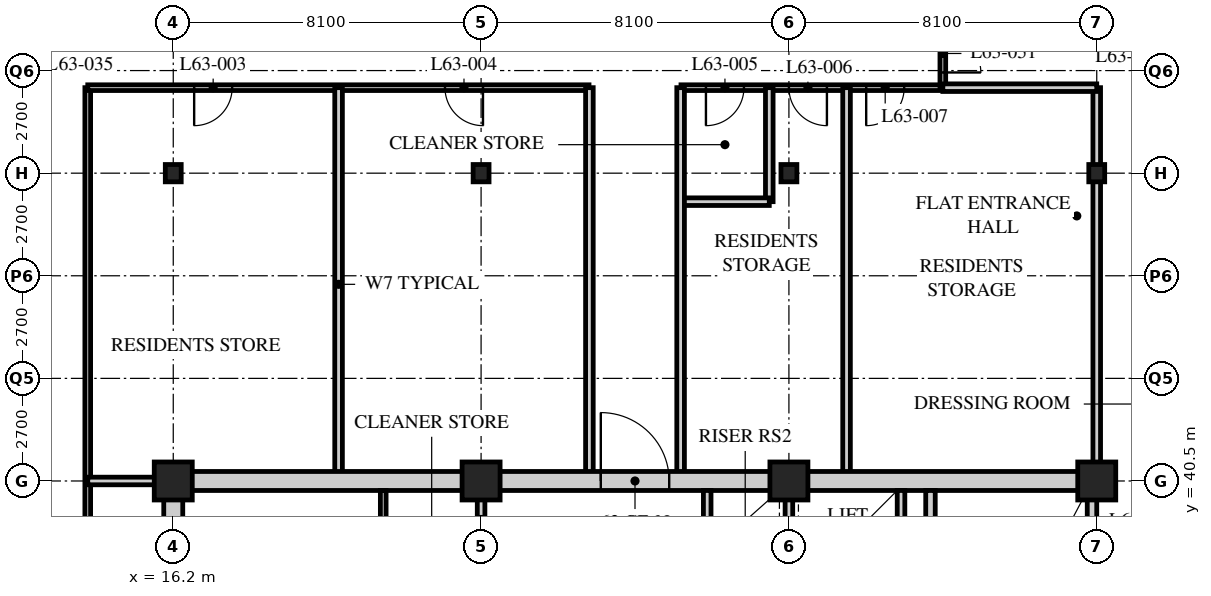
"""IFC4 building model, lengths in metres.
Left out: names, types, materials, properties, quantities, classifications, styles, units other than length and angle.
Written with IfcOpenShell. Run it as: python <this file> out.ifc"""

import sys

from ifc_helpers import new_model, si_unit, direction, frame, frame_2d, origin, origin_2d, place, context, subcontext, project, spatial, rectangle, hollow_rectangle, i_section, extrude, element, fill, save


model = new_model("IFC4")
c1 = context("Model", 3, precision=1e-05, world=origin(), true_north=direction((0.0, 1.0)))
c2 = subcontext(c1, "Body", "Model", "MODEL_VIEW")
j1 = project(units=[si_unit("LENGTHUNIT", "METRE"), si_unit("PLANEANGLEUNIT", "RADIAN")], contexts=[c1])
p1 = place(None, origin())
s1 = spatial("IfcSite", under=j1, at=p1, CompositionType="ELEMENT")
p2 = place(p1, origin())
s2 = spatial("IfcBuilding", under=s1, at=p2, CompositionType="ELEMENT")
p3 = place(p2, frame((0.0, 0.0, 246.3)))
s3 = spatial("IfcBuildingStorey", under=s2, at=p3, CompositionType="ELEMENT", Elevation=246.3)
p4 = place(p3, frame((16.2, 40.5, 0.0), z_axis=(0.0, 0.0, 1.0), x_axis=(1.0, 0.0, 0.0)))
e1 = element("IfcColumn", 1, at=p4, inside=s3, PredefinedType="COLUMN", context=c2, shape_type="SweptSolid", body=[
    extrude(hollow_rectangle(XDim=1.0, YDim=1.0, WallThickness=0.1, at=origin_2d()), origin(), (0.0, 0.0, 1.0), 3.9),
])
p5 = place(p3, frame((16.2, 48.6, 0.0), z_axis=(0.0, 0.0, 1.0), x_axis=(1.0, 0.0, 0.0)))
e2 = element("IfcColumn", 2, at=p5, inside=s3, PredefinedType="COLUMN", context=c2, shape_type="SweptSolid", body=[
    extrude(i_section(OverallWidth=0.418, OverallDepth=0.456, WebThickness=0.042, FlangeThickness=0.067, FilletRadius=0.015, at=origin_2d()), origin(), (0.0, 0.0, 1.0), 3.9),
])
p6 = place(p3, frame((24.3, 40.5, 0.0), z_axis=(0.0, 0.0, 1.0), x_axis=(1.0, 0.0, 0.0)))
e3 = element("IfcColumn", 3, at=p6, inside=s3, PredefinedType="COLUMN", context=c2, shape_type="SweptSolid", body=[
    extrude(hollow_rectangle(XDim=1.0, YDim=1.0, WallThickness=0.1, at=origin_2d()), origin(), (0.0, 0.0, 1.0), 3.9),
])
p7 = place(p3, frame((24.3, 48.6, 0.0), z_axis=(0.0, 0.0, 1.0), x_axis=(1.0, 0.0, 0.0)))
e4 = element("IfcColumn", 4, at=p7, inside=s3, PredefinedType="COLUMN", context=c2, shape_type="SweptSolid", body=[
    extrude(i_section(OverallWidth=0.418, OverallDepth=0.456, WebThickness=0.042, FlangeThickness=0.067, FilletRadius=0.015, at=origin_2d()), origin(), (0.0, 0.0, 1.0), 3.9),
])
p8 = place(p3, frame((32.4, 40.5, 0.0), z_axis=(0.0, 0.0, 1.0), x_axis=(1.0, 0.0, 0.0)))
e5 = element("IfcColumn", 5, at=p8, inside=s3, PredefinedType="COLUMN", context=c2, shape_type="SweptSolid", body=[
    extrude(hollow_rectangle(XDim=1.0, YDim=1.0, WallThickness=0.1, at=origin_2d()), origin(), (0.0, 0.0, 1.0), 3.9),
])
p9 = place(p3, frame((32.4, 48.6, 0.0), z_axis=(0.0, 0.0, 1.0), x_axis=(1.0, 0.0, 0.0)))
e6 = element("IfcColumn", 6, at=p9, inside=s3, PredefinedType="COLUMN", context=c2, shape_type="SweptSolid", body=[
    extrude(i_section(OverallWidth=0.418, OverallDepth=0.456, WebThickness=0.042, FlangeThickness=0.067, FilletRadius=0.015, at=origin_2d()), origin(), (0.0, 0.0, 1.0), 3.9),
])
p10 = place(p3, frame((40.5, 40.5, 0.0), z_axis=(0.0, 0.0, 1.0), x_axis=(1.0, 0.0, 0.0)))
e7 = element("IfcColumn", 7, at=p10, inside=s3, PredefinedType="COLUMN", context=c2, shape_type="SweptSolid", body=[
    extrude(hollow_rectangle(XDim=1.0, YDim=1.0, WallThickness=0.1, at=origin_2d()), origin(), (0.0, 0.0, 1.0), 3.9),
])
p11 = place(p3, frame((40.5, 48.6, 0.0), z_axis=(0.0, 0.0, 1.0), x_axis=(1.0, 0.0, 0.0)))
e8 = element("IfcColumn", 8, at=p11, inside=s3, PredefinedType="COLUMN", context=c2, shape_type="SweptSolid", body=[
    extrude(i_section(OverallWidth=0.418, OverallDepth=0.456, WebThickness=0.042, FlangeThickness=0.067, FilletRadius=0.015, at=origin_2d()), origin(), (0.0, 0.0, 1.0), 3.9),
])
p12 = place(p3, frame((13.95, 24.3, 0.0), z_axis=(0.0, 0.0, 1.0), x_axis=(0.0, 1.0, 0.0)))
e9 = element("IfcWall", 9, at=p12, inside=s3, PredefinedType="PARTITIONING", context=c2, shape_type="SweptSolid", body=[
    extrude(rectangle(XDim=26.55, YDim=0.15, at=frame_2d((13.275, 0.0))), origin(), (0.0, 0.0, 1.0), 3.69),
])
p13 = place(p12, frame((3.55, 0.0, 0.0)))
e10 = element("IfcOpeningElement", 10, at=p13, cuts=e9, PredefinedType="OPENING", context=c2, shape_type="SweptSolid", body=[
    extrude(rectangle(XDim=1.0, YDim=2.1, at=frame_2d((0.5, 1.05))), frame((0.0, 0.085, 0.0), z_axis=(0.0, -1.0, 0.0), x_axis=(1.0, 0.0, 0.0)), (0.0, 0.0, 1.0), 0.17),
])
p14 = place(p12, frame((11.65, 0.0, 0.0)))
e11 = element("IfcOpeningElement", 11, at=p14, cuts=e9, PredefinedType="OPENING", context=c2, shape_type="SweptSolid", body=[
    extrude(rectangle(XDim=1.0, YDim=2.1, at=frame_2d((0.5, 1.05))), frame((0.0, 0.085, 0.0), z_axis=(0.0, -1.0, 0.0), x_axis=(1.0, 0.0, 0.0)), (0.0, 0.0, 1.0), 0.17),
])
p15 = place(p3, frame((13.95, 50.85, 0.0), z_axis=(0.0, 0.0, 1.0), x_axis=(1.0, 0.0, 0.0)))
e12 = element("IfcWall", 12, at=p15, inside=s3, PredefinedType="PARTITIONING", context=c2, shape_type="SweptSolid", body=[
    extrude(rectangle(XDim=13.19, YDim=0.15, at=frame_2d((6.595, 0.0))), origin(), (0.0, 0.0, 1.0), 3.69),
])
p16 = place(p15, frame((2.8, 0.0, 0.0)))
e13 = element("IfcOpeningElement", 13, at=p16, cuts=e12, PredefinedType="OPENING", context=c2, shape_type="SweptSolid", body=[
    extrude(rectangle(XDim=1.0, YDim=2.1, at=frame_2d((0.5, 1.05))), frame((0.0, 0.085, 0.0), z_axis=(0.0, -1.0, 0.0), x_axis=(1.0, 0.0, 0.0)), (0.0, 0.0, 1.0), 0.17),
])
p17 = place(p15, frame((9.4, 0.0, 0.0)))
e14 = element("IfcOpeningElement", 14, at=p17, cuts=e12, PredefinedType="OPENING", context=c2, shape_type="SweptSolid", body=[
    extrude(rectangle(XDim=1.0, YDim=2.1, at=frame_2d((0.5, 1.05))), frame((0.0, 0.085, 0.0), z_axis=(0.0, -1.0, 0.0), x_axis=(1.0, 0.0, 0.0)), (0.0, 0.0, 1.0), 0.17),
])
p18 = place(p3, frame((29.56, 50.85, 0.0), z_axis=(0.0, 0.0, 1.0), x_axis=(1.0, 0.0, 0.0)))
e15 = element("IfcWall", 15, at=p18, inside=s3, PredefinedType="PARTITIONING", context=c2, shape_type="SweptSolid", body=[
    extrude(rectangle(XDim=6.89, YDim=0.15, at=frame_2d((3.445, 0.0))), origin(), (0.0, 0.0, 1.0), 3.69),
])
p19 = place(p18, frame((0.657, 0.0, 0.0)))
e16 = element("IfcOpeningElement", 16, at=p19, cuts=e15, PredefinedType="OPENING", context=c2, shape_type="SweptSolid", body=[
    extrude(rectangle(XDim=1.0, YDim=2.1, at=frame_2d((0.5, 1.05))), frame((0.0, 0.085, 0.0), z_axis=(0.0, -1.0, 0.0), x_axis=(1.0, 0.0, 0.0)), (0.0, 0.0, 1.0), 0.17),
])
p20 = place(p18, frame((2.84, 0.0, 0.0)))
e17 = element("IfcOpeningElement", 17, at=p20, cuts=e15, PredefinedType="OPENING", context=c2, shape_type="SweptSolid", body=[
    extrude(rectangle(XDim=1.0, YDim=2.1, at=frame_2d((0.5, 1.05))), frame((0.0, 0.085, 0.0), z_axis=(0.0, -1.0, 0.0), x_axis=(1.0, 0.0, 0.0)), (0.0, 0.0, 1.0), 0.17),
])
p21 = place(p18, frame((4.873, 0.0, 0.0)))
e18 = element("IfcOpeningElement", 18, at=p21, cuts=e15, PredefinedType="OPENING", context=c2, shape_type="SweptSolid", body=[
    extrude(rectangle(XDim=1.0, YDim=2.1, at=frame_2d((0.5, 1.05))), frame((0.0, 0.085, 0.0), z_axis=(0.0, -1.0, 0.0), x_axis=(1.0, 0.0, 0.0)), (0.0, 0.0, 1.0), 0.17),
])
p22 = place(p3, frame((20.55, 50.85, 0.0), z_axis=(0.0, 0.0, 1.0), x_axis=(0.0, -1.0, 0.0)))
e19 = element("IfcWall", 19, at=p22, inside=s3, PredefinedType="SOLIDWALL", context=c2, shape_type="SweptSolid", body=[
    extrude(rectangle(XDim=10.35, YDim=0.2, at=frame_2d((5.175, 0.0))), origin(), (0.0, 0.0, 1.0), 3.69),
])
p23 = place(p3, frame((31.883, 50.85, 0.0), z_axis=(0.0, 0.0, 1.0), x_axis=(0.0, -1.0, 0.0)))
e20 = element("IfcWall", 20, at=p23, inside=s3, PredefinedType="SOLIDWALL", context=c2, shape_type="SweptSolid", body=[
    extrude(rectangle(XDim=3.0, YDim=0.2, at=frame_2d((1.5, 0.0))), origin(), (0.0, 0.0, 1.0), 3.69),
])
p24 = place(p3, frame((29.55, 47.85, 0.0), z_axis=(0.0, 0.0, 1.0), x_axis=(1.0, 0.0, 0.0)))
e21 = element("IfcWall", 21, at=p24, inside=s3, PredefinedType="SOLIDWALL", context=c2, shape_type="SweptSolid", body=[
    extrude(rectangle(XDim=2.333, YDim=0.2, at=frame_2d((1.167, 0.0))), origin(), (0.0, 0.0, 1.0), 3.69),
])
for number, where, z_axis, x_axis in (
    (22, (33.917, 50.85, 0.0), (0.0, 0.0, 1.0), (0.0, -1.0, 0.0)),
    (23, (27.15, 40.5, 0.0), (0.0, 0.0, 1.0), (0.0, 1.0, 0.0)),
    (24, (29.55, 40.5, 0.0), (0.0, 0.0, 1.0), (0.0, 1.0, 0.0)),
):
    element("IfcWall", number, at=place(p3, frame(where, z_axis=z_axis, x_axis=x_axis)), inside=s3, PredefinedType="SOLIDWALL", context=c2, shape_type="SweptSolid", body=[
        extrude(rectangle(XDim=10.35, YDim=0.2, at=frame_2d((5.175, 0.0))), origin(), (0.0, 0.0, 1.0), 3.69),
    ])
p25 = place(p3, frame((36.45, 50.85, 0.0), z_axis=(0.0, 0.0, 1.0), x_axis=(0.0, 1.0, 0.0)))
e25 = element("IfcWall", 25, at=p25, inside=s3, PredefinedType="PARTITIONING", context=c2, shape_type="SweptSolid", body=[
    extrude(rectangle(XDim=1.8, YDim=0.15, at=frame_2d((0.9, 0.0))), origin(), (0.0, 0.0, 1.0), 3.69),
])
p26 = place(p25, frame((0.4, 0.0, 0.0)))
e26 = element("IfcOpeningElement", 26, at=p26, cuts=e25, PredefinedType="OPENING", context=c2, shape_type="SweptSolid", body=[
    extrude(rectangle(XDim=1.0, YDim=2.1, at=frame_2d((0.5, 1.05))), frame((0.0, 0.085, 0.0), z_axis=(0.0, -1.0, 0.0), x_axis=(1.0, 0.0, 0.0)), (0.0, 0.0, 1.0), 0.17),
])
p27 = place(p3, frame((40.5, 40.5, 0.0), z_axis=(0.0, 0.0, 1.0), x_axis=(0.0, 1.0, 0.0)))
e27 = element("IfcWall", 27, at=p27, inside=s3, PredefinedType="SOLIDWALL", context=c2, shape_type="SweptSolid", body=[
    extrude(rectangle(XDim=10.35, YDim=0.2, at=frame_2d((5.175, 0.0))), origin(), (0.0, 0.0, 1.0), 3.078),
])
p28 = place(p3, frame((13.95, 40.5, 0.0), z_axis=(0.0, 0.0, 1.0), x_axis=(1.0, 0.0, 0.0)))
e28 = element("IfcWall", 28, at=p28, inside=s3, PredefinedType="SOLIDWALL", context=c2, shape_type="SweptSolid", body=[
    extrude(rectangle(XDim=2.25, YDim=0.2, at=frame_2d((1.125, 0.0))), origin(), (0.0, 0.0, 1.0), 3.078),
])
p29 = place(p3, frame((36.45, 50.85, 0.0), z_axis=(0.0, 0.0, 1.0), x_axis=(1.0, 0.0, 0.0)))
e29 = element("IfcWall", 29, at=p29, inside=s3, PredefinedType="SOLIDWALL", context=c2, shape_type="SweptSolid", body=[
    extrude(rectangle(XDim=4.05, YDim=0.2, at=frame_2d((2.025, 0.0))), origin(), (0.0, 0.0, 1.0), 3.69),
])
p30 = place(p3, frame((15.95, 40.5, 0.0), z_axis=(0.0, 0.0, 1.0), x_axis=(1.0, 0.0, 0.0)))
e30 = element("IfcWall", 30, at=p30, inside=s3, PredefinedType="SOLIDWALL", context=c2, shape_type="SweptSolid", body=[
    extrude(rectangle(XDim=24.55, YDim=0.5, at=frame_2d((12.275, 0.0))), origin(), (0.0, 0.0, 1.0), 3.04),
])
p31 = place(p30, frame((11.5, 0.0, 0.0)))
e31 = element("IfcOpeningElement", 31, at=p31, cuts=e30, PredefinedType="OPENING", context=c2, shape_type="SweptSolid", body=[
    extrude(rectangle(XDim=1.8, YDim=2.4, at=frame_2d((0.9, 1.2))), frame((0.0, 0.26, 0.0), z_axis=(0.0, -1.0, 0.0), x_axis=(1.0, 0.0, 0.0)), (0.0, 0.0, 1.0), 0.52),
])
p32 = place(p3, frame((16.2, 24.55, 0.0), z_axis=(0.0, 0.0, 1.0), x_axis=(0.0, 1.0, 0.0)))
e32 = element("IfcWall", 32, at=p32, inside=s3, PredefinedType="SOLIDWALL", context=c2, shape_type="SweptSolid", body=[
    extrude(rectangle(XDim=15.7, YDim=0.5, at=frame_2d((7.85, 0.0))), origin(), (0.0, 0.0, 1.0), 3.078),
])
p33 = place(p3, frame((40.375, 24.55, 0.0), z_axis=(0.0, 0.0, 1.0), x_axis=(0.0, 1.0, 0.0)))
e33 = element("IfcWall", 33, at=p33, inside=s3, PredefinedType="SOLIDWALL", context=c2, shape_type="SweptSolid", body=[
    extrude(rectangle(XDim=15.7, YDim=0.25, at=frame_2d((7.85, 0.0))), origin(), (0.0, 0.0, 1.0), 3.078),
])
p34 = place(p3, frame((32.4, 32.5, 0.0), z_axis=(0.0, 0.0, 1.0), x_axis=(0.0, 1.0, 0.0)))
e34 = element("IfcWall", 34, at=p34, inside=s3, PredefinedType="SOLIDWALL", context=c2, shape_type="SweptSolid", body=[
    extrude(rectangle(XDim=7.75, YDim=0.2, at=frame_2d((3.875, 0.0))), origin(), (0.0, 0.0, 1.0), 3.078),
])
p35 = place(p34, frame((1.9, 0.0, 0.0)))
e35 = element("IfcOpeningElement", 35, at=p35, cuts=e34, PredefinedType="OPENING", context=c2, shape_type="SweptSolid", body=[
    extrude(rectangle(XDim=1.2, YDim=2.1, at=frame_2d((0.6, 1.05))), frame((0.0, 0.11, 0.0), z_axis=(0.0, -1.0, 0.0), x_axis=(1.0, 0.0, 0.0)), (0.0, 0.0, 1.0), 0.22),
])
p36 = place(p3, frame((36.125, 32.5, 0.0), z_axis=(0.0, 0.0, 1.0), x_axis=(0.0, 1.0, 0.0)))
e36 = element("IfcWall", 36, at=p36, inside=s3, PredefinedType="SOLIDWALL", context=c2, shape_type="SweptSolid", body=[
    extrude(rectangle(XDim=7.75, YDim=0.25, at=frame_2d((3.875, 0.0))), origin(), (0.0, 0.0, 1.0), 3.69),
])
p37 = place(p36, frame((0.45, 0.0, 0.0)))
e37 = element("IfcOpeningElement", 37, at=p37, cuts=e36, PredefinedType="OPENING", context=c2, shape_type="SweptSolid", body=[
    extrude(rectangle(XDim=1.2, YDim=2.1, at=frame_2d((0.6, 1.05))), frame((0.0, 0.135, 0.0), z_axis=(0.0, -1.0, 0.0), x_axis=(1.0, 0.0, 0.0)), (0.0, 0.0, 1.0), 0.27),
])
p38 = place(p3, frame((35.35, 37.65, 0.0), z_axis=(0.0, 0.0, 1.0), x_axis=(0.0, 1.0, 0.0)))
e38 = element("IfcWall", 38, at=p38, inside=s3, PredefinedType="SOLIDWALL", context=c2, shape_type="SweptSolid", body=[
    extrude(rectangle(XDim=2.6, YDim=0.2, at=frame_2d((1.3, 0.0))), origin(), (0.0, 0.0, 1.0), 3.69),
])
p39 = place(p3, frame((30.25, 38.65, 0.0), z_axis=(0.0, 0.0, 1.0), x_axis=(0.0, 1.0, 0.0)))
e39 = element("IfcWall", 39, at=p39, inside=s3, PredefinedType="SOLIDWALL", context=c2, shape_type="SweptSolid", body=[
    extrude(rectangle(XDim=1.6, YDim=0.2, at=frame_2d((0.8, 0.0))), origin(), (0.0, 0.0, 1.0), 3.69),
])
p40 = place(p3, frame((24.3, 32.5, 0.0), z_axis=(0.0, 0.0, 1.0), x_axis=(0.0, 1.0, 0.0)))
e40 = element("IfcWall", 40, at=p40, inside=s3, PredefinedType="PARTITIONING", context=c2, shape_type="SweptSolid", body=[
    extrude(rectangle(XDim=7.75, YDim=0.2, at=frame_2d((3.875, 0.0))), origin(), (0.0, 0.0, 1.0), 3.078),
])
p41 = place(p40, frame((0.8, 0.0, 0.0)))
e41 = element("IfcOpeningElement", 41, at=p41, cuts=e40, PredefinedType="OPENING", context=c2, shape_type="SweptSolid", body=[
    extrude(rectangle(XDim=1.0, YDim=2.1, at=frame_2d((0.5, 1.05))), frame((0.0, 0.11, 0.0), z_axis=(0.0, -1.0, 0.0), x_axis=(1.0, 0.0, 0.0)), (0.0, 0.0, 1.0), 0.22),
])
p42 = place(p40, frame((3.6, 0.0, 0.0)))
e42 = element("IfcOpeningElement", 42, at=p42, cuts=e40, PredefinedType="OPENING", context=c2, shape_type="SweptSolid", body=[
    extrude(rectangle(XDim=0.9, YDim=2.1, at=frame_2d((0.45, 1.05))), frame((0.0, 0.11, 0.0), z_axis=(0.0, -1.0, 0.0), x_axis=(1.0, 0.0, 0.0)), (0.0, 0.0, 1.0), 0.22),
])
p43 = place(p40, frame((6.175, 0.0, 0.0)))
e43 = element("IfcOpeningElement", 43, at=p43, cuts=e40, PredefinedType="OPENING", context=c2, shape_type="SweptSolid", body=[
    extrude(rectangle(XDim=0.9, YDim=2.1, at=frame_2d((0.45, 1.05))), frame((0.0, 0.11, 0.0), z_axis=(0.0, -1.0, 0.0), x_axis=(1.0, 0.0, 0.0)), (0.0, 0.0, 1.0), 0.22),
])
p44 = place(p3, frame((21.725, 38.0, 0.0), z_axis=(0.0, 0.0, 1.0), x_axis=(0.0, 1.0, 0.0)))
e44 = element("IfcWall", 44, at=p44, inside=s3, PredefinedType="PARTITIONING", context=c2, shape_type="SweptSolid", body=[
    extrude(rectangle(XDim=2.25, YDim=0.15, at=frame_2d((1.125, 0.0))), origin(), (0.0, 0.0, 1.0), 3.69),
])
p45 = place(p16, origin())
e45 = element("IfcDoor", 45, at=p45, inside=s3, OperationType="SINGLE_SWING_RIGHT", PredefinedType="DOOR", context=c2, shape_type="SweptSolid", body=[
    extrude(rectangle(XDim=1.0, YDim=2.1, at=frame_2d((0.5, 1.05))), frame((0.0, 0.025, 0.0), z_axis=(0.0, -1.0, 0.0), x_axis=(1.0, 0.0, 0.0)), (0.0, 0.0, 1.0), 0.05),
])
fill(e13, e45)
p46 = place(p17, origin())
e46 = element("IfcDoor", 46, at=p46, inside=s3, OperationType="SINGLE_SWING_LEFT", PredefinedType="DOOR", context=c2, shape_type="SweptSolid", body=[
    extrude(rectangle(XDim=1.0, YDim=2.1, at=frame_2d((0.5, 1.05))), frame((0.0, 0.025, 0.0), z_axis=(0.0, -1.0, 0.0), x_axis=(1.0, 0.0, 0.0)), (0.0, 0.0, 1.0), 0.05),
])
fill(e14, e46)
p47 = place(p19, origin())
e47 = element("IfcDoor", 47, at=p47, inside=s3, OperationType="SINGLE_SWING_RIGHT", PredefinedType="DOOR", context=c2, shape_type="SweptSolid", body=[
    extrude(rectangle(XDim=1.0, YDim=2.1, at=frame_2d((0.5, 1.05))), frame((0.0, 0.025, 0.0), z_axis=(0.0, -1.0, 0.0), x_axis=(1.0, 0.0, 0.0)), (0.0, 0.0, 1.0), 0.05),
])
fill(e16, e47)
p48 = place(p20, origin())
e48 = element("IfcDoor", 48, at=p48, inside=s3, OperationType="SINGLE_SWING_LEFT", PredefinedType="DOOR", context=c2, shape_type="SweptSolid", body=[
    extrude(rectangle(XDim=1.0, YDim=2.1, at=frame_2d((0.5, 1.05))), frame((0.0, 0.025, 0.0), z_axis=(0.0, -1.0, 0.0), x_axis=(1.0, 0.0, 0.0)), (0.0, 0.0, 1.0), 0.05),
])
fill(e17, e48)
p49 = place(p21, origin())
e49 = element("IfcDoor", 49, at=p49, inside=s3, OperationType="SINGLE_SWING_RIGHT", PredefinedType="DOOR", context=c2, shape_type="SweptSolid", body=[
    extrude(rectangle(XDim=1.0, YDim=2.1, at=frame_2d((0.5, 1.05))), frame((0.0, 0.025, 0.0), z_axis=(0.0, -1.0, 0.0), x_axis=(1.0, 0.0, 0.0)), (0.0, 0.0, 1.0), 0.05),
])
fill(e18, e49)
p50 = place(p26, origin())
e50 = element("IfcDoor", 50, at=p50, inside=s3, OperationType="SINGLE_SWING_RIGHT", PredefinedType="DOOR", context=c2, shape_type="SweptSolid", body=[
    extrude(rectangle(XDim=1.0, YDim=2.1, at=frame_2d((0.5, 1.05))), frame((0.0, 0.025, 0.0), z_axis=(0.0, -1.0, 0.0), x_axis=(1.0, 0.0, 0.0)), (0.0, 0.0, 1.0), 0.05),
])
fill(e26, e50)
p51 = place(p31, origin())
e51 = element("IfcDoor", 51, at=p51, inside=s3, OperationType="DOUBLE_DOOR_SINGLE_SWING", PredefinedType="DOOR", context=c2, shape_type="SweptSolid", body=[
    extrude(rectangle(XDim=1.8, YDim=2.4, at=frame_2d((0.9, 1.2))), frame((0.0, 0.025, 0.0), z_axis=(0.0, -1.0, 0.0), x_axis=(1.0, 0.0, 0.0)), (0.0, 0.0, 1.0), 0.05),
])
fill(e31, e51)
save(model, sys.argv[1])
